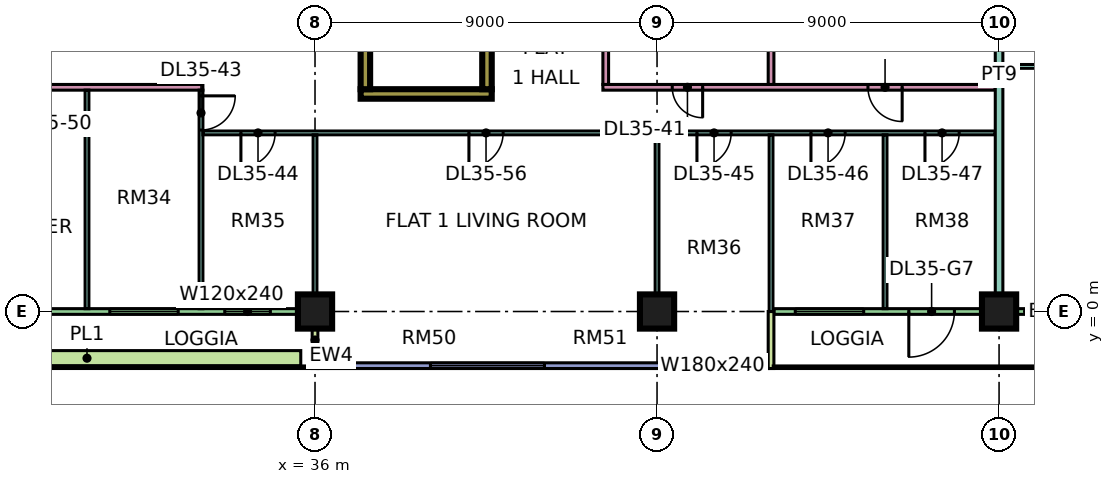
"""IFC4 building model, lengths in metres.
Left out: names, types, materials, properties, quantities, classifications, styles, units other than length and angle.
Written with IfcOpenShell. Run it as: python <this file> out.ifc"""

import sys

from ifc_helpers import new_model, si_unit, direction, frame, frame_2d, origin, origin_2d, place, context, subcontext, project, spatial, rectangle, extrude, element, fill, save


model = new_model("IFC4")
c1 = context("Model", 3, precision=1e-05, world=origin(), true_north=direction((0.0, 1.0)))
c2 = subcontext(c1, "Body", "Model", "MODEL_VIEW")
j1 = project(units=[si_unit("LENGTHUNIT", "METRE"), si_unit("PLANEANGLEUNIT", "RADIAN")], contexts=[c1])
p1 = place(None, origin())
s1 = spatial("IfcSite", under=j1, at=p1, CompositionType="ELEMENT")
p2 = place(p1, origin())
s2 = spatial("IfcBuilding", under=s1, at=p2, CompositionType="ELEMENT")
p3 = place(p2, frame((0.0, 0.0, 157.4)))
s3 = spatial("IfcBuildingStorey", under=s2, at=p3, CompositionType="ELEMENT", Elevation=157.4)
for number, where, z_axis, x_axis in (
    (1, (36.0, 0.0, 0.0), (0.0, 0.0, 1.0), (1.0, 0.0, 0.0)),
    (2, (45.0, 0.0, 0.0), (0.0, 0.0, 1.0), (1.0, 0.0, 0.0)),
    (3, (54.0, 0.0, 0.0), (0.0, 0.0, 1.0), (1.0, 0.0, 0.0)),
):
    element("IfcColumn", number, at=place(p3, frame(where, z_axis=z_axis, x_axis=x_axis)), inside=s3, PredefinedType="COLUMN", context=c2, shape_type="SweptSolid", body=[
        extrude(rectangle(XDim=0.9, YDim=0.9, at=origin_2d()), origin(), (0.0, 0.0, 1.0), 3.75),
    ])
p4 = place(p3, frame((37.2, 5.725, 0.0), z_axis=(0.0, 0.0, 1.0), x_axis=(1.0, 0.0, 0.0)))
e4 = element("IfcWall", 4, at=p4, inside=s3, PredefinedType="SHEAR", context=c2, shape_type="SweptSolid", body=[
    extrude(rectangle(XDim=3.45, YDim=0.25, at=frame_2d((1.725, 0.0))), origin(), (0.0, 0.0, 1.0), 3.75),
])
for number, where, z_axis, x_axis in (
    (5, (37.325, 5.85, 0.0), (0.0, 0.0, 1.0), (0.0, 1.0, 0.0)),
    (6, (40.525, 5.85, 0.0), (0.0, 0.0, 1.0), (0.0, 1.0, 0.0)),
):
    element("IfcWall", number, at=place(p3, frame(where, z_axis=z_axis, x_axis=x_axis)), inside=s3, PredefinedType="SHEAR", context=c2, shape_type="SweptSolid", body=[
        extrude(rectangle(XDim=6.5, YDim=0.25, at=frame_2d((3.25, 0.0))), origin(), (0.0, 0.0, 1.0), 3.75),
    ])
p5 = place(p3, frame((24.075, 0.0, 0.0), z_axis=(0.0, 0.0, 1.0), x_axis=(1.0, 0.0, 0.0)))
e7 = element("IfcWall", 7, at=p5, inside=s3, PredefinedType="SOLIDWALL", context=c2, shape_type="SweptSolid", body=[
    extrude(rectangle(XDim=11.85, YDim=0.15, at=frame_2d((5.925, 0.0))), origin(), (0.0, 0.0, 1.0), 3.35),
])
p6 = place(p5, frame((2.3, 0.0, 0.0)))
e8 = element("IfcOpeningElement", 8, at=p6, cuts=e7, PredefinedType="OPENING", context=c2, shape_type="SweptSolid", body=[
    extrude(rectangle(XDim=1.8, YDim=2.4, at=frame_2d((0.9, 1.2))), frame((0.0, 0.085, 0.0), z_axis=(0.0, -1.0, 0.0), x_axis=(1.0, 0.0, 0.0)), (0.0, 0.0, 1.0), 0.17),
])
p7 = place(p5, frame((6.525, 0.0, 0.45)))
e9 = element("IfcOpeningElement", 9, at=p7, cuts=e7, PredefinedType="OPENING", context=c2, shape_type="SweptSolid", body=[
    extrude(rectangle(XDim=1.8, YDim=2.4, at=frame_2d((0.9, 1.2))), frame((0.0, 0.085, 0.0), z_axis=(0.0, -1.0, 0.0), x_axis=(1.0, 0.0, 0.0)), (0.0, 0.0, 1.0), 0.17),
])
p8 = place(p5, frame((9.55, 0.0, 0.45)))
e10 = element("IfcOpeningElement", 10, at=p8, cuts=e7, PredefinedType="OPENING", context=c2, shape_type="SweptSolid", body=[
    extrude(rectangle(XDim=1.2, YDim=2.4, at=frame_2d((0.6, 1.2))), frame((0.0, 0.085, 0.0), z_axis=(0.0, -1.0, 0.0), x_axis=(1.0, 0.0, 0.0)), (0.0, 0.0, 1.0), 0.17),
])
p9 = place(p3, frame((36.0, -1.5, 0.0), z_axis=(0.0, 0.0, 1.0), x_axis=(0.0, 1.0, 0.0)))
e11 = element("IfcWall", 11, at=p9, inside=s3, PredefinedType="SOLIDWALL", context=c2, shape_type="SweptSolid", body=[
    extrude(rectangle(XDim=1.5, YDim=0.15, at=frame_2d((0.75, 0.0))), origin(), (0.0, 0.0, 1.0), 3.35),
])
p10 = place(p3, frame((36.075, -1.425, 0.0), z_axis=(0.0, 0.0, 1.0), x_axis=(1.0, 0.0, 0.0)))
e12 = element("IfcWall", 12, at=p10, inside=s3, PredefinedType="SOLIDWALL", context=c2, shape_type="SweptSolid", body=[
    extrude(rectangle(XDim=11.85, YDim=0.15, at=frame_2d((5.925, 0.0))), origin(), (0.0, 0.0, 1.0), 3.35),
])
p11 = place(p10, frame((2.962, 0.0, 0.45)))
e13 = element("IfcOpeningElement", 13, at=p11, cuts=e12, PredefinedType="OPENING", context=c2, shape_type="SweptSolid", body=[
    extrude(rectangle(XDim=3.0, YDim=2.4, at=frame_2d((1.5, 1.2))), frame((0.0, 0.085, 0.0), z_axis=(0.0, -1.0, 0.0), x_axis=(1.0, 0.0, 0.0)), (0.0, 0.0, 1.0), 0.17),
])
p12 = place(p10, frame((9.488, 0.0, 0.45)))
e14 = element("IfcOpeningElement", 14, at=p12, cuts=e12, PredefinedType="OPENING", context=c2, shape_type="SweptSolid", body=[
    extrude(rectangle(XDim=1.8, YDim=2.4, at=frame_2d((0.9, 1.2))), frame((0.0, 0.085, 0.0), z_axis=(0.0, -1.0, 0.0), x_axis=(1.0, 0.0, 0.0)), (0.0, 0.0, 1.0), 0.17),
])
p13 = place(p3, frame((48.075, 0.0, 0.0), z_axis=(0.0, 0.0, 1.0), x_axis=(1.0, 0.0, 0.0)))
e15 = element("IfcWall", 15, at=p13, inside=s3, PredefinedType="SOLIDWALL", context=c2, shape_type="SweptSolid", body=[
    extrude(rectangle(XDim=13.35, YDim=0.15, at=frame_2d((6.675, 0.0))), origin(), (0.0, 0.0, 1.0), 3.35),
])
p14 = place(p13, frame((0.562, 0.0, 0.45)))
e16 = element("IfcOpeningElement", 16, at=p14, cuts=e15, PredefinedType="OPENING", context=c2, shape_type="SweptSolid", body=[
    extrude(rectangle(XDim=1.8, YDim=2.4, at=frame_2d((0.9, 1.2))), frame((0.0, 0.085, 0.0), z_axis=(0.0, -1.0, 0.0), x_axis=(1.0, 0.0, 0.0)), (0.0, 0.0, 1.0), 0.17),
])
p15 = place(p13, frame((3.55, 0.0, 0.0)))
e17 = element("IfcOpeningElement", 17, at=p15, cuts=e15, PredefinedType="OPENING", context=c2, shape_type="SweptSolid", body=[
    extrude(rectangle(XDim=1.2, YDim=2.4, at=frame_2d((0.6, 1.2))), frame((0.0, 0.085, 0.0), z_axis=(0.0, -1.0, 0.0), x_axis=(1.0, 0.0, 0.0)), (0.0, 0.0, 1.0), 0.17),
])
p16 = place(p13, frame((7.1, 0.0, 0.45)))
e18 = element("IfcOpeningElement", 18, at=p16, cuts=e15, PredefinedType="OPENING", context=c2, shape_type="SweptSolid", body=[
    extrude(rectangle(XDim=1.2, YDim=2.4, at=frame_2d((0.6, 1.2))), frame((0.0, 0.085, 0.0), z_axis=(0.0, -1.0, 0.0), x_axis=(1.0, 0.0, 0.0)), (0.0, 0.0, 1.0), 0.17),
])
p17 = place(p13, frame((9.637, 0.0, 0.45)))
e19 = element("IfcOpeningElement", 19, at=p17, cuts=e15, PredefinedType="OPENING", context=c2, shape_type="SweptSolid", body=[
    extrude(rectangle(XDim=3.0, YDim=2.4, at=frame_2d((1.5, 1.2))), frame((0.0, 0.085, 0.0), z_axis=(0.0, -1.0, 0.0), x_axis=(1.0, 0.0, 0.0)), (0.0, 0.0, 1.0), 0.17),
])
p18 = place(p3, frame((48.0, -1.5, 0.0), z_axis=(0.0, 0.0, 1.0), x_axis=(0.0, 1.0, 0.0)))
e20 = element("IfcWall", 20, at=p18, inside=s3, PredefinedType="SOLIDWALL", context=c2, shape_type="SweptSolid", body=[
    extrude(rectangle(XDim=1.5, YDim=0.15, at=frame_2d((0.75, 0.0))), origin(), (0.0, 0.0, 1.0), 3.35),
])
p19 = place(p3, frame((24.375, -1.229, 0.0), z_axis=(0.0, 0.0, 1.0), x_axis=(1.0, 0.0, 0.0)))
e21 = element("IfcWall", 21, at=p19, inside=s3, PredefinedType="SOLIDWALL", context=c2, shape_type="SweptSolid", body=[
    extrude(rectangle(XDim=11.25, YDim=0.4, at=frame_2d((5.625, 0.0))), origin(), (0.0, 0.0, 1.0), 0.7),
])
p20 = place(p3, frame((11.95, 5.9, 0.0), z_axis=(0.0, 0.0, 1.0), x_axis=(1.0, 0.0, 0.0)))
e22 = element("IfcWall", 22, at=p20, inside=s3, PredefinedType="PARTITIONING", context=c2, shape_type="SweptSolid", body=[
    extrude(rectangle(XDim=21.1, YDim=0.15, at=frame_2d((10.55, 0.0))), origin(), (0.0, 0.0, 1.0), 3.35),
])
p21 = place(p20, frame((1.1, 0.0, 0.0)))
e23 = element("IfcOpeningElement", 23, at=p21, cuts=e22, PredefinedType="OPENING", context=c2, shape_type="SweptSolid", body=[
    extrude(rectangle(XDim=0.9, YDim=2.1, at=frame_2d((0.45, 1.05))), frame((0.0, 0.085, 0.0), z_axis=(0.0, -1.0, 0.0), x_axis=(1.0, 0.0, 0.0)), (0.0, 0.0, 1.0), 0.17),
])
p22 = place(p20, frame((16.1, 0.0, 0.0)))
e24 = element("IfcOpeningElement", 24, at=p22, cuts=e22, PredefinedType="OPENING", context=c2, shape_type="SweptSolid", body=[
    extrude(rectangle(XDim=0.9, YDim=2.1, at=frame_2d((0.45, 1.05))), frame((0.0, 0.085, 0.0), z_axis=(0.0, -1.0, 0.0), x_axis=(1.0, 0.0, 0.0)), (0.0, 0.0, 1.0), 0.17),
])
p23 = place(p20, frame((7.1, 0.0, 0.0)))
e25 = element("IfcOpeningElement", 25, at=p23, cuts=e22, PredefinedType="OPENING", context=c2, shape_type="SweptSolid", body=[
    extrude(rectangle(XDim=0.9, YDim=2.1, at=frame_2d((0.45, 1.05))), frame((0.0, 0.085, 0.0), z_axis=(0.0, -1.0, 0.0), x_axis=(1.0, 0.0, 0.0)), (0.0, 0.0, 1.0), 0.17),
])
p24 = place(p3, frame((30.0, 0.074, 0.0), z_axis=(0.0, 0.0, 1.0), x_axis=(0.0, 1.0, 0.0)))
e26 = element("IfcWall", 26, at=p24, inside=s3, PredefinedType="PARTITIONING", context=c2, shape_type="SweptSolid", body=[
    extrude(rectangle(XDim=5.751, YDim=0.1, at=frame_2d((2.875, 0.0))), origin(), (0.0, 0.0, 1.0), 3.35),
])
p25 = place(p3, frame((33.0, 0.074, 0.0), z_axis=(0.0, 0.0, 1.0), x_axis=(0.0, 1.0, 0.0)))
e27 = element("IfcWall", 27, at=p25, inside=s3, PredefinedType="PARTITIONING", context=c2, shape_type="SweptSolid", body=[
    extrude(rectangle(XDim=5.751, YDim=0.1, at=frame_2d((2.875, 0.0))), origin(), (0.0, 0.0, 1.0), 3.35),
])
p26 = place(p25, frame((4.701, 0.0, 0.0)))
e28 = element("IfcOpeningElement", 28, at=p26, cuts=e27, PredefinedType="OPENING", context=c2, shape_type="SweptSolid", body=[
    extrude(rectangle(XDim=0.9, YDim=2.1, at=frame_2d((0.45, 1.05))), frame((0.0, 0.06, 0.0), z_axis=(0.0, -1.0, 0.0), x_axis=(1.0, 0.0, 0.0)), (0.0, 0.0, 1.0), 0.12),
])
p27 = place(p3, frame((33.05, 4.7, 0.0), z_axis=(0.0, 0.0, 1.0), x_axis=(1.0, 0.0, 0.0)))
e29 = element("IfcWall", 29, at=p27, inside=s3, PredefinedType="PARTITIONING", context=c2, shape_type="SweptSolid", body=[
    extrude(rectangle(XDim=20.85, YDim=0.1, at=frame_2d((10.425, 0.0))), origin(), (0.0, 0.0, 1.0), 3.35),
])
p28 = place(p27, frame((1.0, 0.0, 0.0)))
e30 = element("IfcOpeningElement", 30, at=p28, cuts=e29, PredefinedType="OPENING", context=c2, shape_type="SweptSolid", body=[
    extrude(rectangle(XDim=0.9, YDim=2.1, at=frame_2d((0.45, 1.05))), frame((0.0, 0.06, 0.0), z_axis=(0.0, -1.0, 0.0), x_axis=(1.0, 0.0, 0.0)), (0.0, 0.0, 1.0), 0.12),
])
p29 = place(p27, frame((13.0, 0.0, 0.0)))
e31 = element("IfcOpeningElement", 31, at=p29, cuts=e29, PredefinedType="OPENING", context=c2, shape_type="SweptSolid", body=[
    extrude(rectangle(XDim=0.9, YDim=2.1, at=frame_2d((0.45, 1.05))), frame((0.0, 0.06, 0.0), z_axis=(0.0, -1.0, 0.0), x_axis=(1.0, 0.0, 0.0)), (0.0, 0.0, 1.0), 0.12),
])
p30 = place(p27, frame((16.0, 0.0, 0.0)))
e32 = element("IfcOpeningElement", 32, at=p30, cuts=e29, PredefinedType="OPENING", context=c2, shape_type="SweptSolid", body=[
    extrude(rectangle(XDim=0.9, YDim=2.1, at=frame_2d((0.45, 1.05))), frame((0.0, 0.06, 0.0), z_axis=(0.0, -1.0, 0.0), x_axis=(1.0, 0.0, 0.0)), (0.0, 0.0, 1.0), 0.12),
])
p31 = place(p27, frame((19.0, 0.0, 0.0)))
e33 = element("IfcOpeningElement", 33, at=p31, cuts=e29, PredefinedType="OPENING", context=c2, shape_type="SweptSolid", body=[
    extrude(rectangle(XDim=0.9, YDim=2.1, at=frame_2d((0.45, 1.05))), frame((0.0, 0.06, 0.0), z_axis=(0.0, -1.0, 0.0), x_axis=(1.0, 0.0, 0.0)), (0.0, 0.0, 1.0), 0.12),
])
p32 = place(p27, frame((7.0, 0.0, 0.0)))
e34 = element("IfcOpeningElement", 34, at=p32, cuts=e29, PredefinedType="OPENING", context=c2, shape_type="SweptSolid", body=[
    extrude(rectangle(XDim=0.9, YDim=2.1, at=frame_2d((0.45, 1.05))), frame((0.0, 0.06, 0.0), z_axis=(0.0, -1.0, 0.0), x_axis=(1.0, 0.0, 0.0)), (0.0, 0.0, 1.0), 0.12),
])
p33 = place(p3, frame((36.0, 0.0, 0.0), z_axis=(0.0, 0.0, 1.0), x_axis=(0.0, 1.0, 0.0)))
e35 = element("IfcWall", 35, at=p33, inside=s3, PredefinedType="PARTITIONING", context=c2, shape_type="SweptSolid", body=[
    extrude(rectangle(XDim=4.65, YDim=0.1, at=frame_2d((2.325, 0.0))), origin(), (0.0, 0.0, 1.0), 3.35),
])
p34 = place(p3, frame((43.575, 5.9, 0.0), z_axis=(0.0, 0.0, 1.0), x_axis=(1.0, 0.0, 0.0)))
e36 = element("IfcWall", 36, at=p34, inside=s3, PredefinedType="PARTITIONING", context=c2, shape_type="SweptSolid", body=[
    extrude(rectangle(XDim=10.325, YDim=0.15, at=frame_2d((5.163, 0.0))), origin(), (0.0, 0.0, 1.0), 3.35),
])
p35 = place(p34, frame((1.825, 0.0, 0.0)))
e37 = element("IfcOpeningElement", 37, at=p35, cuts=e36, PredefinedType="OPENING", context=c2, shape_type="SweptSolid", body=[
    extrude(rectangle(XDim=0.8, YDim=2.1, at=frame_2d((0.4, 1.05))), frame((0.0, 0.085, 0.0), z_axis=(0.0, -1.0, 0.0), x_axis=(1.0, 0.0, 0.0)), (0.0, 0.0, 1.0), 0.17),
])
p36 = place(p34, frame((6.975, 0.0, 0.0)))
e38 = element("IfcOpeningElement", 38, at=p36, cuts=e36, PredefinedType="OPENING", context=c2, shape_type="SweptSolid", body=[
    extrude(rectangle(XDim=0.9, YDim=2.1, at=frame_2d((0.45, 1.05))), frame((0.0, 0.085, 0.0), z_axis=(0.0, -1.0, 0.0), x_axis=(1.0, 0.0, 0.0)), (0.0, 0.0, 1.0), 0.17),
])
p37 = place(p3, frame((43.65, 5.975, 0.0), z_axis=(0.0, 0.0, 1.0), x_axis=(0.0, 1.0, 0.0)))
e39 = element("IfcWall", 39, at=p37, inside=s3, PredefinedType="PARTITIONING", context=c2, shape_type="SweptSolid", body=[
    extrude(rectangle(XDim=6.375, YDim=0.15, at=frame_2d((3.188, 0.0))), origin(), (0.0, 0.0, 1.0), 3.35),
])
p38 = place(p37, frame((4.275, 0.0, 0.0)))
e40 = element("IfcOpeningElement", 40, at=p38, cuts=e39, PredefinedType="OPENING", context=c2, shape_type="SweptSolid", body=[
    extrude(rectangle(XDim=0.9, YDim=2.1, at=frame_2d((0.45, 1.05))), frame((0.0, 0.085, 0.0), z_axis=(0.0, -1.0, 0.0), x_axis=(1.0, 0.0, 0.0)), (0.0, 0.0, 1.0), 0.17),
])
for number, where, z_axis, x_axis in (
    (41, (45.0, 0.0, 0.0), (0.0, 0.0, 1.0), (0.0, 1.0, 0.0)),
    (42, (48.0, 0.0, 0.0), (0.0, 0.0, 1.0), (0.0, 1.0, 0.0)),
):
    element("IfcWall", number, at=place(p3, frame(where, z_axis=z_axis, x_axis=x_axis)), inside=s3, PredefinedType="PARTITIONING", context=c2, shape_type="SweptSolid", body=[
        extrude(rectangle(XDim=4.65, YDim=0.1, at=frame_2d((2.325, 0.0))), origin(), (0.0, 0.0, 1.0), 3.35),
    ])
p39 = place(p3, frame((48.0, 5.975, 0.0), z_axis=(0.0, 0.0, 1.0), x_axis=(0.0, 1.0, 0.0)))
e43 = element("IfcWall", 43, at=p39, inside=s3, PredefinedType="PARTITIONING", context=c2, shape_type="SweptSolid", body=[
    extrude(rectangle(XDim=6.375, YDim=0.15, at=frame_2d((3.188, 0.0))), origin(), (0.0, 0.0, 1.0), 3.35),
])
p40 = place(p3, frame((51.0, 0.074, 0.0), z_axis=(0.0, 0.0, 1.0), x_axis=(0.0, 1.0, 0.0)))
e44 = element("IfcWall", 44, at=p40, inside=s3, PredefinedType="PARTITIONING", context=c2, shape_type="SweptSolid", body=[
    extrude(rectangle(XDim=4.576, YDim=0.1, at=frame_2d((2.288, 0.0))), origin(), (0.0, 0.0, 1.0), 3.35),
])
p41 = place(p3, frame((54.0, 0.074, 0.0), z_axis=(0.0, 0.0, 1.0), x_axis=(0.0, 1.0, 0.0)))
e45 = element("IfcWall", 45, at=p41, inside=s3, PredefinedType="PARTITIONING", context=c2, shape_type="SweptSolid", body=[
    extrude(rectangle(XDim=12.276, YDim=0.2, at=frame_2d((6.138, 0.0))), origin(), (0.0, 0.0, 1.0), 3.35),
])
p42 = place(p3, frame((54.1, 6.45, 0.0), z_axis=(0.0, 0.0, 1.0), x_axis=(1.0, 0.0, 0.0)))
e46 = element("IfcWall", 46, at=p42, inside=s3, PredefinedType="PARTITIONING", context=c2, shape_type="SweptSolid", body=[
    extrude(rectangle(XDim=2.85, YDim=0.1, at=frame_2d((1.425, 0.0))), origin(), (0.0, 0.0, 1.0), 3.35),
])
p43 = place(p42, frame((0.95, 0.0, 0.0)))
e47 = element("IfcOpeningElement", 47, at=p43, cuts=e46, PredefinedType="OPENING", context=c2, shape_type="SweptSolid", body=[
    extrude(rectangle(XDim=0.9, YDim=2.1, at=frame_2d((0.45, 1.05))), frame((0.0, 0.06, 0.0), z_axis=(0.0, -1.0, 0.0), x_axis=(1.0, 0.0, 0.0)), (0.0, 0.0, 1.0), 0.12),
])
p44 = place(p7, origin())
e48 = element("IfcWindow", 48, at=p44, inside=s3, PartitioningType="SINGLE_PANEL", PredefinedType="WINDOW", context=c2, shape_type="SweptSolid", body=[
    extrude(rectangle(XDim=1.8, YDim=2.4, at=frame_2d((0.9, 1.2))), frame((0.0, 0.03, 0.0), z_axis=(0.0, -1.0, 0.0), x_axis=(1.0, 0.0, 0.0)), (0.0, 0.0, 1.0), 0.06),
])
fill(e9, e48)
p45 = place(p8, origin())
e49 = element("IfcWindow", 49, at=p45, inside=s3, PartitioningType="SINGLE_PANEL", PredefinedType="WINDOW", context=c2, shape_type="SweptSolid", body=[
    extrude(rectangle(XDim=1.2, YDim=2.4, at=frame_2d((0.6, 1.2))), frame((0.0, 0.03, 0.0), z_axis=(0.0, -1.0, 0.0), x_axis=(1.0, 0.0, 0.0)), (0.0, 0.0, 1.0), 0.06),
])
fill(e10, e49)
p46 = place(p11, origin())
e50 = element("IfcWindow", 50, at=p46, inside=s3, PartitioningType="SINGLE_PANEL", PredefinedType="WINDOW", context=c2, shape_type="SweptSolid", body=[
    extrude(rectangle(XDim=3.0, YDim=2.4, at=frame_2d((1.5, 1.2))), frame((0.0, 0.03, 0.0), z_axis=(0.0, -1.0, 0.0), x_axis=(1.0, 0.0, 0.0)), (0.0, 0.0, 1.0), 0.06),
])
fill(e13, e50)
p47 = place(p12, origin())
e51 = element("IfcWindow", 51, at=p47, inside=s3, PartitioningType="SINGLE_PANEL", PredefinedType="WINDOW", context=c2, shape_type="SweptSolid", body=[
    extrude(rectangle(XDim=1.8, YDim=2.4, at=frame_2d((0.9, 1.2))), frame((0.0, 0.03, 0.0), z_axis=(0.0, -1.0, 0.0), x_axis=(1.0, 0.0, 0.0)), (0.0, 0.0, 1.0), 0.06),
])
fill(e14, e51)
p48 = place(p14, origin())
e52 = element("IfcWindow", 52, at=p48, inside=s3, PartitioningType="SINGLE_PANEL", PredefinedType="WINDOW", context=c2, shape_type="SweptSolid", body=[
    extrude(rectangle(XDim=1.8, YDim=2.4, at=frame_2d((0.9, 1.2))), frame((0.0, 0.03, 0.0), z_axis=(0.0, -1.0, 0.0), x_axis=(1.0, 0.0, 0.0)), (0.0, 0.0, 1.0), 0.06),
])
fill(e16, e52)
p49 = place(p15, frame((1.2, 0.0, 0.0), z_axis=(0.0, 0.0, 1.0), x_axis=(-1.0, 0.0, 0.0)))
e53 = element("IfcDoor", 53, at=p49, inside=s3, OperationType="DOUBLE_DOOR_SINGLE_SWING", PredefinedType="DOOR", context=c2, shape_type="SweptSolid", body=[
    extrude(rectangle(XDim=1.2, YDim=2.4, at=frame_2d((0.6, 1.2))), frame((0.0, 0.025, 0.0), z_axis=(0.0, -1.0, 0.0), x_axis=(1.0, 0.0, 0.0)), (0.0, 0.0, 1.0), 0.05),
])
fill(e17, e53)
p50 = place(p35, origin())
e54 = element("IfcDoor", 54, at=p50, inside=s3, OperationType="SINGLE_SWING_RIGHT", PredefinedType="DOOR", context=c2, shape_type="SweptSolid", body=[
    extrude(rectangle(XDim=0.8, YDim=2.1, at=frame_2d((0.4, 1.05))), frame((0.0, 0.025, 0.0), z_axis=(0.0, -1.0, 0.0), x_axis=(1.0, 0.0, 0.0)), (0.0, 0.0, 1.0), 0.05),
])
fill(e37, e54)
p51 = place(p26, origin())
e55 = element("IfcDoor", 55, at=p51, inside=s3, OperationType="SINGLE_SWING_RIGHT", PredefinedType="DOOR", context=c2, shape_type="SweptSolid", body=[
    extrude(rectangle(XDim=0.9, YDim=2.1, at=frame_2d((0.45, 1.05))), frame((0.0, 0.025, 0.0), z_axis=(0.0, -1.0, 0.0), x_axis=(1.0, 0.0, 0.0)), (0.0, 0.0, 1.0), 0.05),
])
fill(e28, e55)
p52 = place(p28, frame((0.9, 0.0, 0.0), z_axis=(0.0, 0.0, 1.0), x_axis=(-1.0, 0.0, 0.0)))
e56 = element("IfcDoor", 56, at=p52, inside=s3, OperationType="SINGLE_SWING_LEFT", PredefinedType="DOOR", context=c2, shape_type="SweptSolid", body=[
    extrude(rectangle(XDim=0.9, YDim=2.1, at=frame_2d((0.45, 1.05))), frame((0.0, 0.025, 0.0), z_axis=(0.0, -1.0, 0.0), x_axis=(1.0, 0.0, 0.0)), (0.0, 0.0, 1.0), 0.05),
])
fill(e30, e56)
p53 = place(p29, frame((0.9, 0.0, 0.0), z_axis=(0.0, 0.0, 1.0), x_axis=(-1.0, 0.0, 0.0)))
e57 = element("IfcDoor", 57, at=p53, inside=s3, OperationType="SINGLE_SWING_LEFT", PredefinedType="DOOR", context=c2, shape_type="SweptSolid", body=[
    extrude(rectangle(XDim=0.9, YDim=2.1, at=frame_2d((0.45, 1.05))), frame((0.0, 0.025, 0.0), z_axis=(0.0, -1.0, 0.0), x_axis=(1.0, 0.0, 0.0)), (0.0, 0.0, 1.0), 0.05),
])
fill(e31, e57)
p54 = place(p30, frame((0.9, 0.0, 0.0), z_axis=(0.0, 0.0, 1.0), x_axis=(-1.0, 0.0, 0.0)))
e58 = element("IfcDoor", 58, at=p54, inside=s3, OperationType="SINGLE_SWING_LEFT", PredefinedType="DOOR", context=c2, shape_type="SweptSolid", body=[
    extrude(rectangle(XDim=0.9, YDim=2.1, at=frame_2d((0.45, 1.05))), frame((0.0, 0.025, 0.0), z_axis=(0.0, -1.0, 0.0), x_axis=(1.0, 0.0, 0.0)), (0.0, 0.0, 1.0), 0.05),
])
fill(e32, e58)
p55 = place(p31, frame((0.9, 0.0, 0.0), z_axis=(0.0, 0.0, 1.0), x_axis=(-1.0, 0.0, 0.0)))
e59 = element("IfcDoor", 59, at=p55, inside=s3, OperationType="SINGLE_SWING_LEFT", PredefinedType="DOOR", context=c2, shape_type="SweptSolid", body=[
    extrude(rectangle(XDim=0.9, YDim=2.1, at=frame_2d((0.45, 1.05))), frame((0.0, 0.025, 0.0), z_axis=(0.0, -1.0, 0.0), x_axis=(1.0, 0.0, 0.0)), (0.0, 0.0, 1.0), 0.05),
])
fill(e33, e59)
p56 = place(p36, origin())
e60 = element("IfcDoor", 60, at=p56, inside=s3, OperationType="SINGLE_SWING_RIGHT", PredefinedType="DOOR", context=c2, shape_type="SweptSolid", body=[
    extrude(rectangle(XDim=0.9, YDim=2.1, at=frame_2d((0.45, 1.05))), frame((0.0, 0.025, 0.0), z_axis=(0.0, -1.0, 0.0), x_axis=(1.0, 0.0, 0.0)), (0.0, 0.0, 1.0), 0.05),
])
fill(e38, e60)
p57 = place(p32, frame((0.9, 0.0, 0.0), z_axis=(0.0, 0.0, 1.0), x_axis=(-1.0, 0.0, 0.0)))
e61 = element("IfcDoor", 61, at=p57, inside=s3, OperationType="SINGLE_SWING_LEFT", PredefinedType="DOOR", context=c2, shape_type="SweptSolid", body=[
    extrude(rectangle(XDim=0.9, YDim=2.1, at=frame_2d((0.45, 1.05))), frame((0.0, 0.025, 0.0), z_axis=(0.0, -1.0, 0.0), x_axis=(1.0, 0.0, 0.0)), (0.0, 0.0, 1.0), 0.05),
])
fill(e34, e61)
save(model, sys.argv[1])
